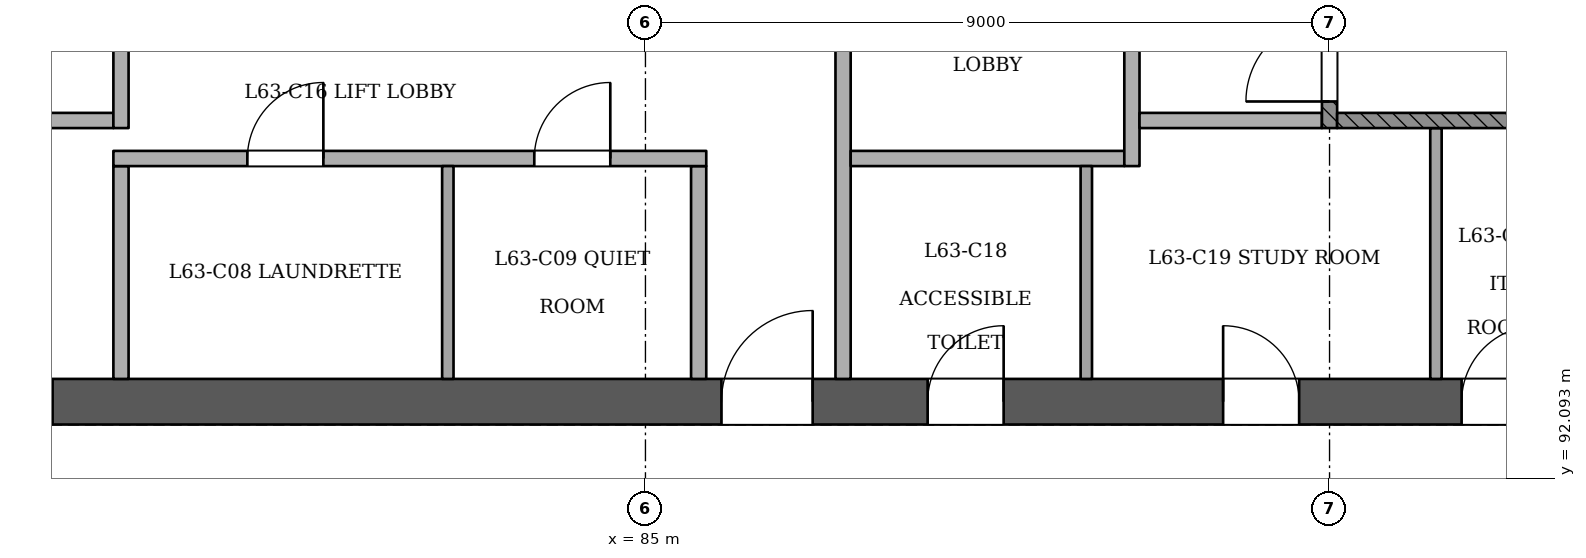
"""IFC4 building model, lengths in metres.
Left out: names, types, materials, properties, quantities, classifications, styles, units other than length and angle.
Written with IfcOpenShell. Run it as: python <this file> out.ifc"""

import sys

from ifc_helpers import new_model, si_unit, direction, frame, frame_2d, origin, place, context, subcontext, project, spatial, rectangle, extrude, element, fill, save


model = new_model("IFC4")
c1 = context("Model", 3, precision=1e-05, world=origin(), true_north=direction((0.0, 1.0)))
c2 = subcontext(c1, "Body", "Model", "MODEL_VIEW")
j1 = project(units=[si_unit("LENGTHUNIT", "METRE"), si_unit("PLANEANGLEUNIT", "RADIAN")], contexts=[c1])
p1 = place(None, origin())
s1 = spatial("IfcSite", under=j1, at=p1, CompositionType="ELEMENT")
p2 = place(p1, origin())
s2 = spatial("IfcBuilding", under=s1, at=p2, CompositionType="ELEMENT")
p3 = place(p2, frame((0.0, 0.0, 246.4)))
s3 = spatial("IfcBuildingStorey", under=s2, at=p3, CompositionType="ELEMENT", Elevation=246.4)
p4 = place(p3, frame((72.7, 93.1, 0.0), z_axis=(0.0, 0.0, 1.0), x_axis=(1.0, 0.0, 0.0)))
e1 = element("IfcWall", 1, at=p4, inside=s3, PredefinedType="SHEAR", context=c2, shape_type="SweptSolid", body=[
    extrude(rectangle(XDim=24.9, YDim=0.6, at=frame_2d((12.45, 0.0))), origin(), (0.0, 0.0, 1.0), 3.6),
])
p5 = place(p4, frame((1.1, 0.0, 0.0)))
e2 = element("IfcOpeningElement", 2, at=p5, cuts=e1, PredefinedType="OPENING", context=c2, shape_type="SweptSolid", body=[
    extrude(rectangle(XDim=1.2, YDim=2.1, at=frame_2d((0.6, 1.05))), frame((0.0, 0.311, 0.0), z_axis=(0.0, -1.0, 0.0), x_axis=(1.0, 0.0, 0.0)), (0.0, 0.0, 1.0), 0.621),
])
p6 = place(p4, frame((3.3, 0.0, 0.0)))
e3 = element("IfcOpeningElement", 3, at=p6, cuts=e1, PredefinedType="OPENING", context=c2, shape_type="SweptSolid", body=[
    extrude(rectangle(XDim=1.2, YDim=2.1, at=frame_2d((0.6, 1.05))), frame((0.0, 0.311, 0.0), z_axis=(0.0, -1.0, 0.0), x_axis=(1.0, 0.0, 0.0)), (0.0, 0.0, 1.0), 0.621),
])
p7 = place(p4, frame((13.3, 0.0, 0.0)))
e4 = element("IfcOpeningElement", 4, at=p7, cuts=e1, PredefinedType="OPENING", context=c2, shape_type="SweptSolid", body=[
    extrude(rectangle(XDim=1.2, YDim=2.1, at=frame_2d((0.6, 1.05))), frame((0.0, 0.311, 0.0), z_axis=(0.0, -1.0, 0.0), x_axis=(1.0, 0.0, 0.0)), (0.0, 0.0, 1.0), 0.621),
])
p8 = place(p4, frame((16.012, 0.0, 0.0)))
e5 = element("IfcOpeningElement", 5, at=p8, cuts=e1, PredefinedType="OPENING", context=c2, shape_type="SweptSolid", body=[
    extrude(rectangle(XDim=1.0, YDim=2.1, at=frame_2d((0.5, 1.05))), frame((0.0, 0.311, 0.0), z_axis=(0.0, -1.0, 0.0), x_axis=(1.0, 0.0, 0.0)), (0.0, 0.0, 1.0), 0.621),
])
p9 = place(p4, frame((19.9, 0.0, 0.0)))
e6 = element("IfcOpeningElement", 6, at=p9, cuts=e1, PredefinedType="OPENING", context=c2, shape_type="SweptSolid", body=[
    extrude(rectangle(XDim=1.0, YDim=2.1, at=frame_2d((0.5, 1.05))), frame((0.0, 0.311, 0.0), z_axis=(0.0, -1.0, 0.0), x_axis=(1.0, 0.0, 0.0)), (0.0, 0.0, 1.0), 0.621),
])
p10 = place(p4, frame((23.038, 0.0, 0.0)))
e7 = element("IfcOpeningElement", 7, at=p10, cuts=e1, PredefinedType="OPENING", context=c2, shape_type="SweptSolid", body=[
    extrude(rectangle(XDim=1.0, YDim=2.1, at=frame_2d((0.5, 1.05))), frame((0.0, 0.311, 0.0), z_axis=(0.0, -1.0, 0.0), x_axis=(1.0, 0.0, 0.0)), (0.0, 0.0, 1.0), 0.621),
])
p11 = place(p3, frame((78.1, 93.4, 0.0), z_axis=(0.0, 0.0, 1.0), x_axis=(0.0, 1.0, 0.0)))
e8 = element("IfcWall", 8, at=p11, inside=s3, PredefinedType="PARTITIONING", context=c2, shape_type="SweptSolid", body=[
    extrude(rectangle(XDim=2.8, YDim=0.2, at=frame_2d((1.4, 0.0))), origin(), (0.0, 0.0, 1.0), 3.2),
])
p12 = place(p3, frame((82.4, 93.4, 0.0), z_axis=(0.0, 0.0, 1.0), x_axis=(0.0, 1.0, 0.0)))
e9 = element("IfcWall", 9, at=p12, inside=s3, PredefinedType="PARTITIONING", context=c2, shape_type="SweptSolid", body=[
    extrude(rectangle(XDim=2.8, YDim=0.15, at=frame_2d((1.4, 0.0))), origin(), (0.0, 0.0, 1.0), 3.2),
])
p13 = place(p3, frame((85.7, 93.4, 0.0), z_axis=(0.0, 0.0, 1.0), x_axis=(0.0, 1.0, 0.0)))
e10 = element("IfcWall", 10, at=p13, inside=s3, PredefinedType="PARTITIONING", context=c2, shape_type="SweptSolid", body=[
    extrude(rectangle(XDim=2.8, YDim=0.2, at=frame_2d((1.4, 0.0))), origin(), (0.0, 0.0, 1.0), 3.2),
])
p14 = place(p3, frame((87.6, 93.4, 0.0), z_axis=(0.0, 0.0, 1.0), x_axis=(0.0, 1.0, 0.0)))
e11 = element("IfcWall", 11, at=p14, inside=s3, PredefinedType="PARTITIONING", context=c2, shape_type="SweptSolid", body=[
    extrude(rectangle(XDim=7.0, YDim=0.2, at=frame_2d((3.5, 0.0))), origin(), (0.0, 0.0, 1.0), 3.2),
])
p15 = place(p14, frame((4.45, 0.0, 0.0)))
e12 = element("IfcOpeningElement", 12, at=p15, cuts=e11, PredefinedType="OPENING", context=c2, shape_type="SweptSolid", body=[
    extrude(rectangle(XDim=1.1, YDim=2.1, at=frame_2d((0.55, 1.05))), frame((0.0, 0.11, 0.0), z_axis=(0.0, -1.0, 0.0), x_axis=(1.0, 0.0, 0.0)), (0.0, 0.0, 1.0), 0.221),
])
p16 = place(p3, frame((90.8, 93.4, 0.0), z_axis=(0.0, 0.0, 1.0), x_axis=(0.0, 1.0, 0.0)))
e13 = element("IfcWall", 13, at=p16, inside=s3, PredefinedType="PARTITIONING", context=c2, shape_type="SweptSolid", body=[
    extrude(rectangle(XDim=2.8, YDim=0.15, at=frame_2d((1.4, 0.0))), origin(), (0.0, 0.0, 1.0), 3.2),
])
p17 = place(p3, frame((95.4, 93.4, 0.0), z_axis=(0.0, 0.0, 1.0), x_axis=(0.0, 1.0, 0.0)))
e14 = element("IfcWall", 14, at=p17, inside=s3, PredefinedType="PARTITIONING", context=c2, shape_type="SweptSolid", body=[
    extrude(rectangle(XDim=3.3, YDim=0.15, at=frame_2d((1.65, 0.0))), origin(), (0.0, 0.0, 1.0), 3.2),
])
p18 = place(p3, frame((78.0, 96.3, 0.0), z_axis=(0.0, 0.0, 1.0), x_axis=(1.0, 0.0, 0.0)))
e15 = element("IfcWall", 15, at=p18, inside=s3, PredefinedType="PARTITIONING", context=c2, shape_type="SweptSolid", body=[
    extrude(rectangle(XDim=7.8, YDim=0.2, at=frame_2d((3.9, 0.0))), origin(), (0.0, 0.0, 1.0), 3.2),
])
p19 = place(p18, frame((1.762, 0.0, 0.0)))
e16 = element("IfcOpeningElement", 16, at=p19, cuts=e15, PredefinedType="OPENING", context=c2, shape_type="SweptSolid", body=[
    extrude(rectangle(XDim=1.0, YDim=2.1, at=frame_2d((0.5, 1.05))), frame((0.0, 0.11, 0.0), z_axis=(0.0, -1.0, 0.0), x_axis=(1.0, 0.0, 0.0)), (0.0, 0.0, 1.0), 0.221),
])
p20 = place(p18, frame((5.538, 0.0, 0.0)))
e17 = element("IfcOpeningElement", 17, at=p20, cuts=e15, PredefinedType="OPENING", context=c2, shape_type="SweptSolid", body=[
    extrude(rectangle(XDim=1.0, YDim=2.1, at=frame_2d((0.5, 1.05))), frame((0.0, 0.11, 0.0), z_axis=(0.0, -1.0, 0.0), x_axis=(1.0, 0.0, 0.0)), (0.0, 0.0, 1.0), 0.221),
])
p21 = place(p3, frame((87.7, 96.3, 0.0), z_axis=(0.0, 0.0, 1.0), x_axis=(1.0, 0.0, 0.0)))
e18 = element("IfcWall", 18, at=p21, inside=s3, PredefinedType="PARTITIONING", context=c2, shape_type="SweptSolid", body=[
    extrude(rectangle(XDim=3.6, YDim=0.2, at=frame_2d((1.8, 0.0))), origin(), (0.0, 0.0, 1.0), 3.2),
])
p22 = place(p3, frame((91.4, 96.2, 0.0), z_axis=(0.0, 0.0, 1.0), x_axis=(0.0, 1.0, 0.0)))
e19 = element("IfcWall", 19, at=p22, inside=s3, PredefinedType="PARTITIONING", context=c2, shape_type="SweptSolid", body=[
    extrude(rectangle(XDim=4.2, YDim=0.2, at=frame_2d((2.1, 0.0))), origin(), (0.0, 0.0, 1.0), 3.2),
])
p23 = place(p22, frame((2.45, 0.0, 0.0)))
e20 = element("IfcOpeningElement", 20, at=p23, cuts=e19, PredefinedType="OPENING", context=c2, shape_type="SweptSolid", body=[
    extrude(rectangle(XDim=1.1, YDim=2.1, at=frame_2d((0.55, 1.05))), frame((0.0, 0.11, 0.0), z_axis=(0.0, -1.0, 0.0), x_axis=(1.0, 0.0, 0.0)), (0.0, 0.0, 1.0), 0.221),
])
p24 = place(p3, frame((76.1, 96.8, 0.0), z_axis=(0.0, 0.0, 1.0), x_axis=(1.0, 0.0, 0.0)))
e21 = element("IfcWall", 21, at=p24, inside=s3, PredefinedType="PARTITIONING", context=c2, shape_type="SweptSolid", body=[
    extrude(rectangle(XDim=1.9, YDim=0.2, at=frame_2d((0.95, 0.0))), origin(), (0.0, 0.0, 1.0), 3.2),
])
p25 = place(p3, frame((78.1, 96.7, 0.0), z_axis=(0.0, 0.0, 1.0), x_axis=(0.0, 1.0, 0.0)))
e22 = element("IfcWall", 22, at=p25, inside=s3, PredefinedType="PARTITIONING", context=c2, shape_type="SweptSolid", body=[
    extrude(rectangle(XDim=3.7, YDim=0.2, at=frame_2d((1.85, 0.0))), origin(), (0.0, 0.0, 1.0), 3.2),
])
p26 = place(p25, frame((1.95, 0.0, 0.0)))
e23 = element("IfcOpeningElement", 23, at=p26, cuts=e22, PredefinedType="OPENING", context=c2, shape_type="SweptSolid", body=[
    extrude(rectangle(XDim=1.1, YDim=2.1, at=frame_2d((0.55, 1.05))), frame((0.0, 0.11, 0.0), z_axis=(0.0, -1.0, 0.0), x_axis=(1.0, 0.0, 0.0)), (0.0, 0.0, 1.0), 0.221),
])
p27 = place(p3, frame((91.5, 96.8, 0.0), z_axis=(0.0, 0.0, 1.0), x_axis=(1.0, 0.0, 0.0)))
e24 = element("IfcWall", 24, at=p27, inside=s3, PredefinedType="PARTITIONING", context=c2, shape_type="SweptSolid", body=[
    extrude(rectangle(XDim=2.4, YDim=0.2, at=frame_2d((1.2, 0.0))), origin(), (0.0, 0.0, 1.0), 3.2),
])
p28 = place(p3, frame((94.0, 96.7, 0.0), z_axis=(0.0, 0.0, 1.0), x_axis=(0.0, 1.0, 0.0)))
e25 = element("IfcWall", 25, at=p28, inside=s3, PredefinedType="SOLIDWALL", context=c2, shape_type="SweptSolid", body=[
    extrude(rectangle(XDim=3.7, YDim=0.2, at=frame_2d((1.85, 0.0))), origin(), (0.0, 0.0, 1.0), 3.2),
])
p29 = place(p28, frame((0.35, 0.0, 0.0)))
e26 = element("IfcOpeningElement", 26, at=p29, cuts=e25, PredefinedType="OPENING", context=c2, shape_type="SweptSolid", body=[
    extrude(rectangle(XDim=1.1, YDim=2.1, at=frame_2d((0.55, 1.05))), frame((0.0, 0.11, 0.0), z_axis=(0.0, -1.0, 0.0), x_axis=(1.0, 0.0, 0.0)), (0.0, 0.0, 1.0), 0.221),
])
p30 = place(p3, frame((94.1, 96.8, 0.0), z_axis=(0.0, 0.0, 1.0), x_axis=(1.0, 0.0, 0.0)))
e27 = element("IfcWall", 27, at=p30, inside=s3, PredefinedType="SOLIDWALL", context=c2, shape_type="SweptSolid", body=[
    extrude(rectangle(XDim=2.9, YDim=0.2, at=frame_2d((1.45, 0.0))), origin(), (0.0, 0.0, 1.0), 3.2),
])
p31 = place(p29, origin())
e28 = element("IfcDoor", 28, at=p31, inside=s3, OperationType="SINGLE_SWING_LEFT", PredefinedType="NOTDEFINED", context=c2, shape_type="SweptSolid", body=[
    extrude(rectangle(XDim=1.1, YDim=2.1, at=frame_2d((0.55, 1.05))), frame((0.0, 0.025, 0.0), z_axis=(0.0, -1.0, 0.0), x_axis=(1.0, 0.0, 0.0)), (0.0, 0.0, 1.0), 0.05),
])
fill(e26, e28)
p32 = place(p6, origin())
e29 = element("IfcDoor", 29, at=p32, inside=s3, OperationType="SINGLE_SWING_LEFT", PredefinedType="NOTDEFINED", context=c2, shape_type="SweptSolid", body=[
    extrude(rectangle(XDim=1.2, YDim=2.1, at=frame_2d((0.6, 1.05))), frame((0.0, 0.025, 0.0), z_axis=(0.0, -1.0, 0.0), x_axis=(1.0, 0.0, 0.0)), (0.0, 0.0, 1.0), 0.05),
])
fill(e3, e29)
p33 = place(p7, origin())
e30 = element("IfcDoor", 30, at=p33, inside=s3, OperationType="SINGLE_SWING_RIGHT", PredefinedType="NOTDEFINED", context=c2, shape_type="SweptSolid", body=[
    extrude(rectangle(XDim=1.2, YDim=2.1, at=frame_2d((0.6, 1.05))), frame((0.0, 0.025, 0.0), z_axis=(0.0, -1.0, 0.0), x_axis=(1.0, 0.0, 0.0)), (0.0, 0.0, 1.0), 0.05),
])
fill(e4, e30)
p34 = place(p8, origin())
e31 = element("IfcDoor", 31, at=p34, inside=s3, OperationType="SINGLE_SWING_RIGHT", PredefinedType="NOTDEFINED", context=c2, shape_type="SweptSolid", body=[
    extrude(rectangle(XDim=1.0, YDim=2.1, at=frame_2d((0.5, 1.05))), frame((0.0, 0.025, 0.0), z_axis=(0.0, -1.0, 0.0), x_axis=(1.0, 0.0, 0.0)), (0.0, 0.0, 1.0), 0.05),
])
fill(e5, e31)
p35 = place(p9, origin())
e32 = element("IfcDoor", 32, at=p35, inside=s3, OperationType="SINGLE_SWING_LEFT", PredefinedType="NOTDEFINED", context=c2, shape_type="SweptSolid", body=[
    extrude(rectangle(XDim=1.0, YDim=2.1, at=frame_2d((0.5, 1.05))), frame((0.0, 0.025, 0.0), z_axis=(0.0, -1.0, 0.0), x_axis=(1.0, 0.0, 0.0)), (0.0, 0.0, 1.0), 0.05),
])
fill(e6, e32)
p36 = place(p10, origin())
e33 = element("IfcDoor", 33, at=p36, inside=s3, OperationType="SINGLE_SWING_RIGHT", PredefinedType="NOTDEFINED", context=c2, shape_type="SweptSolid", body=[
    extrude(rectangle(XDim=1.0, YDim=2.1, at=frame_2d((0.5, 1.05))), frame((0.0, 0.025, 0.0), z_axis=(0.0, -1.0, 0.0), x_axis=(1.0, 0.0, 0.0)), (0.0, 0.0, 1.0), 0.05),
])
fill(e7, e33)
p37 = place(p19, origin())
e34 = element("IfcDoor", 34, at=p37, inside=s3, OperationType="SINGLE_SWING_RIGHT", PredefinedType="NOTDEFINED", context=c2, shape_type="SweptSolid", body=[
    extrude(rectangle(XDim=1.0, YDim=2.1, at=frame_2d((0.5, 1.05))), frame((0.0, 0.025, 0.0), z_axis=(0.0, -1.0, 0.0), x_axis=(1.0, 0.0, 0.0)), (0.0, 0.0, 1.0), 0.05),
])
fill(e16, e34)
p38 = place(p20, origin())
e35 = element("IfcDoor", 35, at=p38, inside=s3, OperationType="SINGLE_SWING_RIGHT", PredefinedType="NOTDEFINED", context=c2, shape_type="SweptSolid", body=[
    extrude(rectangle(XDim=1.0, YDim=2.1, at=frame_2d((0.5, 1.05))), frame((0.0, 0.025, 0.0), z_axis=(0.0, -1.0, 0.0), x_axis=(1.0, 0.0, 0.0)), (0.0, 0.0, 1.0), 0.05),
])
fill(e17, e35)
save(model, sys.argv[1])
